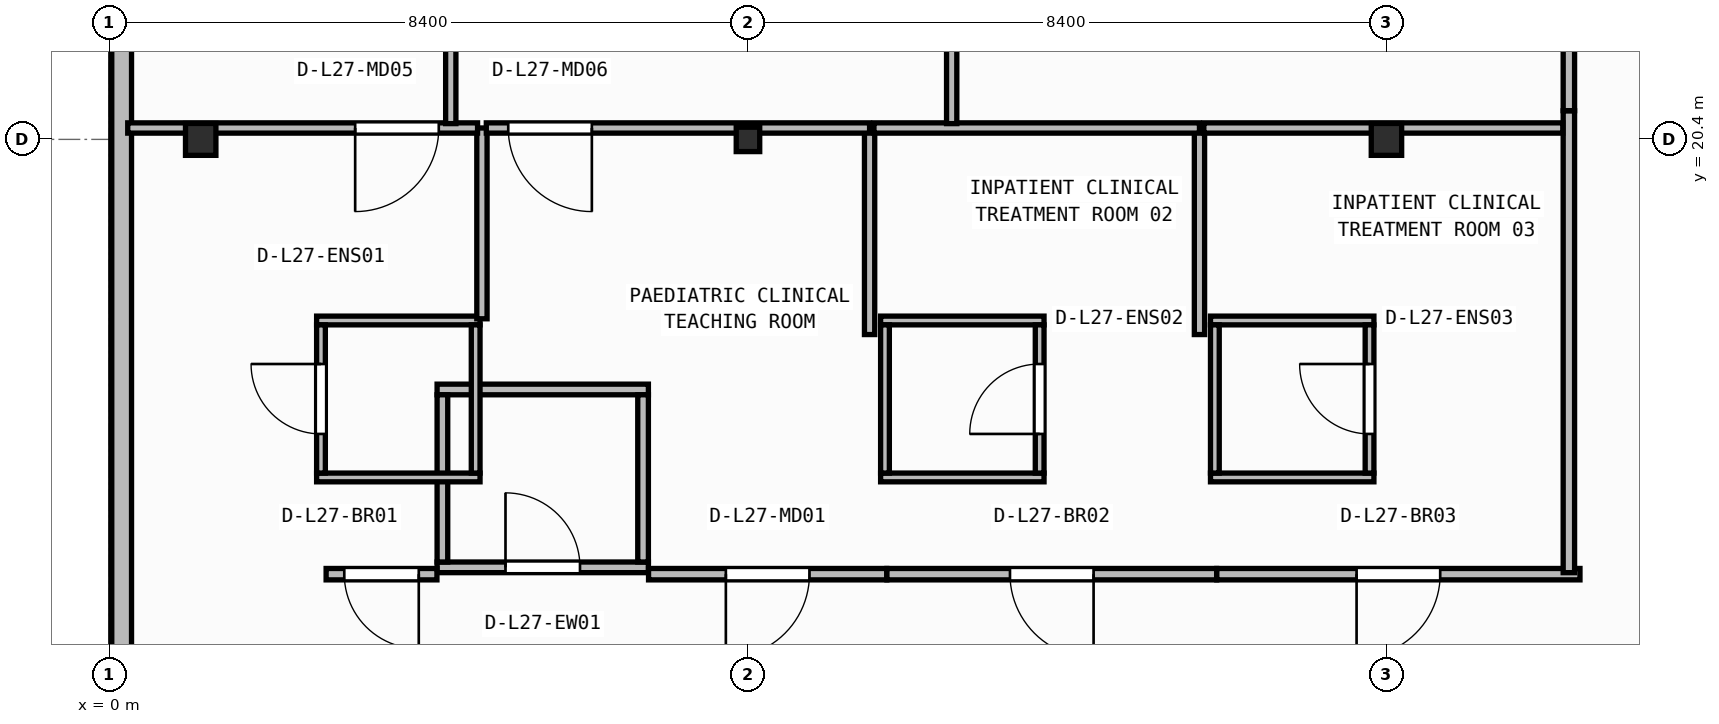
"""IFC4 building model, lengths in metres.
Left out: names, types, materials, properties, quantities, classifications, styles, units other than length and angle.
Written with IfcOpenShell. Run it as: python <this file> out.ifc"""

import sys

from ifc_helpers import new_model, si_unit, direction, frame, frame_2d, origin, origin_2d, place, context, subcontext, project, spatial, rectangle, i_section, extrude, element, fill, save


model = new_model("IFC4")
c1 = context("Model", 3, precision=1e-05, world=origin(), true_north=direction((0.0, 1.0)))
c2 = subcontext(c1, "Body", "Model", "MODEL_VIEW")
j1 = project(units=[si_unit("LENGTHUNIT", "METRE"), si_unit("PLANEANGLEUNIT", "RADIAN")], contexts=[c1])
p1 = place(None, origin())
s1 = spatial("IfcSite", under=j1, at=p1, CompositionType="ELEMENT")
p2 = place(p1, origin())
s2 = spatial("IfcBuilding", under=s1, at=p2, CompositionType="ELEMENT")
p3 = place(p2, frame((0.0, 0.0, 111.25)))
s3 = spatial("IfcBuildingStorey", under=s2, at=p3, CompositionType="ELEMENT", Elevation=111.25)
p4 = place(p3, frame((1.2, 20.4, 0.0), z_axis=(0.0, 0.0, 1.0), x_axis=(1.0, 0.0, 0.0)))
e1 = element("IfcColumn", 1, at=p4, inside=s3, PredefinedType="COLUMN", context=c2, shape_type="SweptSolid", body=[
    extrude(i_section(OverallWidth=0.4, OverallDepth=0.42, WebThickness=0.025, FlangeThickness=0.04, at=origin_2d()), origin(), (0.0, 0.0, 1.0), 3.95),
])
p5 = place(p3, frame((8.4, 20.4, 0.0), z_axis=(0.0, 0.0, 1.0), x_axis=(1.0, 0.0, 0.0)))
e2 = element("IfcColumn", 2, at=p5, inside=s3, PredefinedType="COLUMN", context=c2, shape_type="SweptSolid", body=[
    extrude(i_section(OverallWidth=0.309, OverallDepth=0.321, WebThickness=0.014, FlangeThickness=0.022, FilletRadius=0.017, at=origin_2d()), origin(), (0.0, 0.0, 1.0), 3.95),
])
p6 = place(p3, frame((16.8, 20.4, 0.0), z_axis=(0.0, 0.0, 1.0), x_axis=(1.0, 0.0, 0.0)))
e3 = element("IfcColumn", 3, at=p6, inside=s3, PredefinedType="COLUMN", context=c2, shape_type="SweptSolid", body=[
    extrude(i_section(OverallWidth=0.4, OverallDepth=0.42, WebThickness=0.025, FlangeThickness=0.04, at=origin_2d()), origin(), (0.0, 0.0, 1.0), 3.95),
])
p7 = place(p3, frame((0.16, 40.64, 0.0), z_axis=(0.0, 0.0, 1.0), x_axis=(0.0, -1.0, 0.0)))
e4 = element("IfcWall", 4, at=p7, inside=s3, PredefinedType="STANDARD", context=c2, shape_type="SweptSolid", body=[
    extrude(rectangle(XDim=37.88, YDim=0.26, at=frame_2d((18.94, 0.0))), origin(), (0.0, 0.0, 1.0), 3.71),
])
p8 = place(p7, frame((27.795, 0.0, 0.9)))
e5 = element("IfcOpeningElement", 5, at=p8, cuts=e4, PredefinedType="OPENING", context=c2, shape_type="SweptSolid", body=[
    extrude(rectangle(XDim=2.4, YDim=1.65, at=frame_2d((1.2, 0.825))), frame((0.0, 0.14, 0.0), z_axis=(0.0, -1.0, 0.0), x_axis=(1.0, 0.0, 0.0)), (0.0, 0.0, 1.0), 0.28),
])
p9 = place(p3, frame((4.31, 14.77, 0.0), z_axis=(0.0, 0.0, 1.0), x_axis=(1.0, 0.0, 0.0)))
e6 = element("IfcWall", 6, at=p9, inside=s3, PredefinedType="PARTITIONING", context=c2, shape_type="SweptSolid", body=[
    extrude(rectangle(XDim=2.78, YDim=0.14, at=frame_2d((1.39, 0.0))), origin(), (0.0, 0.0, 1.0), 3.71),
])
p10 = place(p9, frame((0.9, 0.0, 0.0)))
e7 = element("IfcOpeningElement", 7, at=p10, cuts=e6, PredefinedType="OPENING", context=c2, shape_type="SweptSolid", body=[
    extrude(rectangle(XDim=0.98, YDim=2.1, at=frame_2d((0.49, 1.05))), frame((0.0, 0.08, 0.0), z_axis=(0.0, -1.0, 0.0), x_axis=(1.0, 0.0, 0.0)), (0.0, 0.0, 1.0), 0.16),
])
p11 = place(p3, frame((4.31, 17.11, 0.0), z_axis=(0.0, 0.0, 1.0), x_axis=(1.0, 0.0, 0.0)))
e8 = element("IfcWall", 8, at=p11, inside=s3, PredefinedType="PARTITIONING", context=c2, shape_type="SweptSolid", body=[
    extrude(rectangle(XDim=2.78, YDim=0.14, at=frame_2d((1.39, 0.0))), origin(), (0.0, 0.0, 1.0), 3.71),
])
for number, where, z_axis, x_axis in (
    (9, (4.38, 14.84, 0.0), (0.0, 0.0, 1.0), (0.0, 1.0, 0.0)),
    (10, (7.02, 14.84, 0.0), (0.0, 0.0, 1.0), (0.0, 1.0, 0.0)),
):
    element("IfcWall", number, at=place(p3, frame(where, z_axis=z_axis, x_axis=x_axis)), inside=s3, PredefinedType="PARTITIONING", context=c2, shape_type="SweptSolid", body=[
        extrude(rectangle(XDim=2.2, YDim=0.14, at=frame_2d((1.1, 0.0))), origin(), (0.0, 0.0, 1.0), 3.71),
    ])
for number, where, z_axis, x_axis in (
    (11, (2.725, 15.952, 0.0), (0.0, 0.0, 1.0), (1.0, 0.0, 0.0)),
    (12, (2.725, 18.018, 0.0), (0.0, 0.0, 1.0), (1.0, 0.0, 0.0)),
):
    element("IfcWall", number, at=place(p3, frame(where, z_axis=z_axis, x_axis=x_axis)), inside=s3, PredefinedType="PARTITIONING", context=c2, shape_type="SweptSolid", body=[
        extrude(rectangle(XDim=2.15, YDim=0.115, at=frame_2d((1.075, 0.0))), origin(), (0.0, 0.0, 1.0), 3.71),
    ])
p12 = place(p3, frame((2.782, 16.01, 0.0), z_axis=(0.0, 0.0, 1.0), x_axis=(0.0, 1.0, 0.0)))
e13 = element("IfcWall", 13, at=p12, inside=s3, PredefinedType="PARTITIONING", context=c2, shape_type="SweptSolid", body=[
    extrude(rectangle(XDim=1.95, YDim=0.115, at=frame_2d((0.975, 0.0))), origin(), (0.0, 0.0, 1.0), 3.71),
])
p13 = place(p12, frame((0.515, 0.0, 0.0)))
e14 = element("IfcOpeningElement", 14, at=p13, cuts=e13, PredefinedType="OPENING", context=c2, shape_type="SweptSolid", body=[
    extrude(rectangle(XDim=0.92, YDim=2.1, at=frame_2d((0.46, 1.05))), frame((0.0, 0.067, 0.0), z_axis=(0.0, -1.0, 0.0), x_axis=(1.0, 0.0, 0.0)), (0.0, 0.0, 1.0), 0.135),
])
p14 = place(p3, frame((4.817, 16.01, 0.0), z_axis=(0.0, 0.0, 1.0), x_axis=(0.0, 1.0, 0.0)))
e15 = element("IfcWall", 15, at=p14, inside=s3, PredefinedType="PARTITIONING", context=c2, shape_type="SweptSolid", body=[
    extrude(rectangle(XDim=1.95, YDim=0.115, at=frame_2d((0.975, 0.0))), origin(), (0.0, 0.0, 1.0), 3.71),
])
for number, where, z_axis, x_axis in (
    (16, (10.145, 15.952, 0.0), (0.0, 0.0, 1.0), (1.0, 0.0, 0.0)),
    (17, (10.145, 18.018, 0.0), (0.0, 0.0, 1.0), (1.0, 0.0, 0.0)),
):
    element("IfcWall", number, at=place(p3, frame(where, z_axis=z_axis, x_axis=x_axis)), inside=s3, PredefinedType="PARTITIONING", context=c2, shape_type="SweptSolid", body=[
        extrude(rectangle(XDim=2.15, YDim=0.115, at=frame_2d((1.075, 0.0))), origin(), (0.0, 0.0, 1.0), 3.71),
    ])
p15 = place(p3, frame((10.202, 16.01, 0.0), z_axis=(0.0, 0.0, 1.0), x_axis=(0.0, 1.0, 0.0)))
e18 = element("IfcWall", 18, at=p15, inside=s3, PredefinedType="PARTITIONING", context=c2, shape_type="SweptSolid", body=[
    extrude(rectangle(XDim=1.95, YDim=0.115, at=frame_2d((0.975, 0.0))), origin(), (0.0, 0.0, 1.0), 3.71),
])
p16 = place(p3, frame((12.238, 16.01, 0.0), z_axis=(0.0, 0.0, 1.0), x_axis=(0.0, 1.0, 0.0)))
e19 = element("IfcWall", 19, at=p16, inside=s3, PredefinedType="PARTITIONING", context=c2, shape_type="SweptSolid", body=[
    extrude(rectangle(XDim=1.95, YDim=0.115, at=frame_2d((0.975, 0.0))), origin(), (0.0, 0.0, 1.0), 3.71),
])
p17 = place(p16, frame((0.515, 0.0, 0.0)))
e20 = element("IfcOpeningElement", 20, at=p17, cuts=e19, PredefinedType="OPENING", context=c2, shape_type="SweptSolid", body=[
    extrude(rectangle(XDim=0.92, YDim=2.1, at=frame_2d((0.46, 1.05))), frame((0.0, 0.067, 0.0), z_axis=(0.0, -1.0, 0.0), x_axis=(1.0, 0.0, 0.0)), (0.0, 0.0, 1.0), 0.135),
])
for number, where, z_axis, x_axis in (
    (21, (14.485, 15.952, 0.0), (0.0, 0.0, 1.0), (1.0, 0.0, 0.0)),
    (22, (14.485, 18.018, 0.0), (0.0, 0.0, 1.0), (1.0, 0.0, 0.0)),
):
    element("IfcWall", number, at=place(p3, frame(where, z_axis=z_axis, x_axis=x_axis)), inside=s3, PredefinedType="PARTITIONING", context=c2, shape_type="SweptSolid", body=[
        extrude(rectangle(XDim=2.15, YDim=0.115, at=frame_2d((1.075, 0.0))), origin(), (0.0, 0.0, 1.0), 3.71),
    ])
p18 = place(p3, frame((14.542, 16.01, 0.0), z_axis=(0.0, 0.0, 1.0), x_axis=(0.0, 1.0, 0.0)))
e23 = element("IfcWall", 23, at=p18, inside=s3, PredefinedType="PARTITIONING", context=c2, shape_type="SweptSolid", body=[
    extrude(rectangle(XDim=1.95, YDim=0.115, at=frame_2d((0.975, 0.0))), origin(), (0.0, 0.0, 1.0), 3.71),
])
p19 = place(p3, frame((16.577, 16.01, 0.0), z_axis=(0.0, 0.0, 1.0), x_axis=(0.0, 1.0, 0.0)))
e24 = element("IfcWall", 24, at=p19, inside=s3, PredefinedType="PARTITIONING", context=c2, shape_type="SweptSolid", body=[
    extrude(rectangle(XDim=1.95, YDim=0.115, at=frame_2d((0.975, 0.0))), origin(), (0.0, 0.0, 1.0), 3.71),
])
p20 = place(p19, frame((0.515, 0.0, 0.0)))
e25 = element("IfcOpeningElement", 25, at=p20, cuts=e24, PredefinedType="OPENING", context=c2, shape_type="SweptSolid", body=[
    extrude(rectangle(XDim=0.92, YDim=2.1, at=frame_2d((0.46, 1.05))), frame((0.0, 0.067, 0.0), z_axis=(0.0, -1.0, 0.0), x_axis=(1.0, 0.0, 0.0)), (0.0, 0.0, 1.0), 0.135),
])
p21 = place(p3, frame((4.308, 14.68, 0.0), z_axis=(0.0, 0.0, 1.0), x_axis=(-1.0, 0.0, 0.0)))
e26 = element("IfcWall", 26, at=p21, inside=s3, PredefinedType="PARTITIONING", context=c2, shape_type="SweptSolid", body=[
    extrude(rectangle(XDim=1.458, YDim=0.15, at=frame_2d((0.729, 0.0))), origin(), (0.0, 0.0, 1.0), 3.71),
])
p22 = place(p21, frame((0.239, 0.0, 0.0)))
e27 = element("IfcOpeningElement", 27, at=p22, cuts=e26, PredefinedType="OPENING", context=c2, shape_type="SweptSolid", body=[
    extrude(rectangle(XDim=0.98, YDim=2.1, at=frame_2d((0.49, 1.05))), frame((0.0, 0.085, 0.0), z_axis=(0.0, -1.0, 0.0), x_axis=(1.0, 0.0, 0.0)), (0.0, 0.0, 1.0), 0.17),
])
p23 = place(p3, frame((10.226, 14.68, 0.0), z_axis=(0.0, 0.0, 1.0), x_axis=(-1.0, 0.0, 0.0)))
e28 = element("IfcWall", 28, at=p23, inside=s3, PredefinedType="PARTITIONING", context=c2, shape_type="SweptSolid", body=[
    extrude(rectangle(XDim=3.134, YDim=0.15, at=frame_2d((1.567, 0.0))), origin(), (0.0, 0.0, 1.0), 3.71),
])
p24 = place(p23, frame((1.017, 0.0, 0.0)))
e29 = element("IfcOpeningElement", 29, at=p24, cuts=e28, PredefinedType="OPENING", context=c2, shape_type="SweptSolid", body=[
    extrude(rectangle(XDim=1.1, YDim=2.1, at=frame_2d((0.55, 1.05))), frame((0.0, 0.085, 0.0), z_axis=(0.0, -1.0, 0.0), x_axis=(1.0, 0.0, 0.0)), (0.0, 0.0, 1.0), 0.17),
])
p25 = place(p3, frame((14.566, 14.68, 0.0), z_axis=(0.0, 0.0, 1.0), x_axis=(-1.0, 0.0, 0.0)))
e30 = element("IfcWall", 30, at=p25, inside=s3, PredefinedType="PARTITIONING", context=c2, shape_type="SweptSolid", body=[
    extrude(rectangle(XDim=4.338, YDim=0.15, at=frame_2d((2.169, 0.0))), origin(), (0.0, 0.0, 1.0), 3.71),
])
p26 = place(p25, frame((1.619, 0.0, 0.0)))
e31 = element("IfcOpeningElement", 31, at=p26, cuts=e30, PredefinedType="OPENING", context=c2, shape_type="SweptSolid", body=[
    extrude(rectangle(XDim=1.1, YDim=2.1, at=frame_2d((0.55, 1.05))), frame((0.0, 0.085, 0.0), z_axis=(0.0, -1.0, 0.0), x_axis=(1.0, 0.0, 0.0)), (0.0, 0.0, 1.0), 0.17),
])
p27 = place(p3, frame((19.346, 14.68, 0.0), z_axis=(0.0, 0.0, 1.0), x_axis=(-1.0, 0.0, 0.0)))
e32 = element("IfcWall", 32, at=p27, inside=s3, PredefinedType="PARTITIONING", context=c2, shape_type="SweptSolid", body=[
    extrude(rectangle(XDim=4.778, YDim=0.15, at=frame_2d((2.389, 0.0))), origin(), (0.0, 0.0, 1.0), 3.71),
])
p28 = place(p27, frame((1.839, 0.0, 0.0)))
e33 = element("IfcOpeningElement", 33, at=p28, cuts=e32, PredefinedType="OPENING", context=c2, shape_type="SweptSolid", body=[
    extrude(rectangle(XDim=1.1, YDim=2.1, at=frame_2d((0.55, 1.05))), frame((0.0, 0.085, 0.0), z_axis=(0.0, -1.0, 0.0), x_axis=(1.0, 0.0, 0.0)), (0.0, 0.0, 1.0), 0.17),
])
p29 = place(p3, frame((19.2, 20.776, 0.0), z_axis=(0.0, 0.0, 1.0), x_axis=(0.0, -1.0, 0.0)))
e34 = element("IfcWall", 34, at=p29, inside=s3, PredefinedType="PARTITIONING", context=c2, shape_type="SweptSolid", body=[
    extrude(rectangle(XDim=6.076, YDim=0.15, at=frame_2d((3.038, 0.0))), origin(), (0.0, 0.0, 1.0), 3.71),
])
p30 = place(p3, frame((19.2, 27.26, 0.0), z_axis=(0.0, 0.0, 1.0), x_axis=(0.0, -1.0, 0.0)))
e35 = element("IfcWall", 35, at=p30, inside=s3, PredefinedType="PARTITIONING", context=c2, shape_type="SweptSolid", body=[
    extrude(rectangle(XDim=6.482, YDim=0.15, at=frame_2d((3.241, 0.0))), origin(), (0.0, 0.0, 1.0), 3.71),
])
p31 = place(p30, frame((2.068, 0.0, 0.0)))
e36 = element("IfcOpeningElement", 36, at=p31, cuts=e35, PredefinedType="OPENING", context=c2, shape_type="SweptSolid", body=[
    extrude(rectangle(XDim=1.1, YDim=2.1, at=frame_2d((0.55, 1.05))), frame((0.0, 0.085, 0.0), z_axis=(0.0, -1.0, 0.0), x_axis=(1.0, 0.0, 0.0)), (0.0, 0.0, 1.0), 0.17),
])
p32 = place(p3, frame((4.9, 18.04, 0.0), z_axis=(0.0, 0.0, 1.0), x_axis=(0.0, 1.0, 0.0)))
e37 = element("IfcWall", 37, at=p32, inside=s3, PredefinedType="PARTITIONING", context=c2, shape_type="SweptSolid", body=[
    extrude(rectangle(XDim=2.51, YDim=0.135, at=frame_2d((1.255, 0.0))), origin(), (0.0, 0.0, 1.0), 3.71),
])
p33 = place(p3, frame((4.843, 20.55, 0.0), z_axis=(0.0, 0.0, 1.0), x_axis=(-1.0, 0.0, 0.0)))
e38 = element("IfcWall", 38, at=p33, inside=s3, PredefinedType="PARTITIONING", context=c2, shape_type="SweptSolid", body=[
    extrude(rectangle(XDim=4.603, YDim=0.135, at=frame_2d((2.301, 0.0))), origin(), (0.0, 0.0, 1.0), 3.083),
])
p34 = place(p33, frame((0.51, 0.0, 0.0)))
e39 = element("IfcOpeningElement", 39, at=p34, cuts=e38, PredefinedType="OPENING", context=c2, shape_type="SweptSolid", body=[
    extrude(rectangle(XDim=1.1, YDim=2.1, at=frame_2d((0.55, 1.05))), frame((0.0, 0.077, 0.0), z_axis=(0.0, -1.0, 0.0), x_axis=(1.0, 0.0, 0.0)), (0.0, 0.0, 1.0), 0.155),
])
p35 = place(p3, frame((10.0, 17.833, 0.0), z_axis=(0.0, 0.0, 1.0), x_axis=(0.0, 1.0, 0.0)))
e40 = element("IfcWall", 40, at=p35, inside=s3, PredefinedType="PARTITIONING", context=c2, shape_type="SweptSolid", body=[
    extrude(rectangle(XDim=2.718, YDim=0.135, at=frame_2d((1.359, 0.0))), origin(), (0.0, 0.0, 1.0), 3.71),
])
p36 = place(p3, frame((10.0, 20.55, 0.0), z_axis=(0.0, 0.0, 1.0), x_axis=(-1.0, 0.0, 0.0)))
e41 = element("IfcWall", 41, at=p36, inside=s3, PredefinedType="PARTITIONING", context=c2, shape_type="SweptSolid", body=[
    extrude(rectangle(XDim=5.042, YDim=0.135, at=frame_2d((2.521, 0.0))), origin(), (0.0, 0.0, 1.0), 3.083),
])
p37 = place(p36, frame((3.654, 0.0, 0.0)))
e42 = element("IfcOpeningElement", 42, at=p37, cuts=e41, PredefinedType="OPENING", context=c2, shape_type="SweptSolid", body=[
    extrude(rectangle(XDim=1.1, YDim=2.1, at=frame_2d((0.55, 1.05))), frame((0.0, 0.077, 0.0), z_axis=(0.0, -1.0, 0.0), x_axis=(1.0, 0.0, 0.0)), (0.0, 0.0, 1.0), 0.155),
])
p38 = place(p3, frame((14.34, 17.833, 0.0), z_axis=(0.0, 0.0, 1.0), x_axis=(0.0, 1.0, 0.0)))
e43 = element("IfcWall", 43, at=p38, inside=s3, PredefinedType="PARTITIONING", context=c2, shape_type="SweptSolid", body=[
    extrude(rectangle(XDim=2.718, YDim=0.135, at=frame_2d((1.359, 0.0))), origin(), (0.0, 0.0, 1.0), 3.71),
])
p39 = place(p3, frame((14.34, 20.55, 0.0), z_axis=(0.0, 0.0, 1.0), x_axis=(-1.0, 0.0, 0.0)))
e44 = element("IfcWall", 44, at=p39, inside=s3, PredefinedType="PARTITIONING", context=c2, shape_type="SweptSolid", body=[
    extrude(rectangle(XDim=4.282, YDim=0.135, at=frame_2d((2.141, 0.0))), origin(), (0.0, 0.0, 1.0), 3.083),
])
p40 = place(p3, frame((19.12, 20.55, 0.0), z_axis=(0.0, 0.0, 1.0), x_axis=(-1.0, 0.0, 0.0)))
e45 = element("IfcWall", 45, at=p40, inside=s3, PredefinedType="PARTITIONING", context=c2, shape_type="SweptSolid", body=[
    extrude(rectangle(XDim=4.723, YDim=0.135, at=frame_2d((2.361, 0.0))), origin(), (0.0, 0.0, 1.0), 3.083),
])
for number, where, z_axis, x_axis in (
    (46, (4.49, 20.607, 0.0), (0.0, 0.0, 1.0), (0.0, 1.0, 0.0)),
    (47, (11.08, 20.607, 0.0), (0.0, 0.0, 1.0), (0.0, 1.0, 0.0)),
):
    element("IfcWall", number, at=place(p3, frame(where, z_axis=z_axis, x_axis=x_axis)), inside=s3, PredefinedType="PARTITIONING", context=c2, shape_type="SweptSolid", body=[
        extrude(rectangle(XDim=6.493, YDim=0.135, at=frame_2d((3.246, 0.0))), origin(), (0.0, 0.0, 1.0), 3.71),
    ])
p41 = place(p10, origin())
e48 = element("IfcDoor", 48, at=p41, inside=s3, OperationType="SINGLE_SWING_LEFT", PredefinedType="DOOR", context=c2, shape_type="SweptSolid", body=[
    extrude(rectangle(XDim=0.98, YDim=2.1, at=frame_2d((0.49, 1.05))), frame((0.0, 0.025, 0.0), z_axis=(0.0, -1.0, 0.0), x_axis=(1.0, 0.0, 0.0)), (0.0, 0.0, 1.0), 0.05),
])
fill(e7, e48)
p42 = place(p13, origin())
e49 = element("IfcDoor", 49, at=p42, inside=s3, OperationType="SINGLE_SWING_RIGHT", PredefinedType="DOOR", context=c2, shape_type="SweptSolid", body=[
    extrude(rectangle(XDim=0.92, YDim=2.1, at=frame_2d((0.46, 1.05))), frame((0.0, 0.025, 0.0), z_axis=(0.0, -1.0, 0.0), x_axis=(1.0, 0.0, 0.0)), (0.0, 0.0, 1.0), 0.05),
])
fill(e14, e49)
p43 = place(p17, origin())
e50 = element("IfcDoor", 50, at=p43, inside=s3, OperationType="SINGLE_SWING_LEFT", PredefinedType="DOOR", context=c2, shape_type="SweptSolid", body=[
    extrude(rectangle(XDim=0.92, YDim=2.1, at=frame_2d((0.46, 1.05))), frame((0.0, 0.025, 0.0), z_axis=(0.0, -1.0, 0.0), x_axis=(1.0, 0.0, 0.0)), (0.0, 0.0, 1.0), 0.05),
])
fill(e20, e50)
p44 = place(p20, origin())
e51 = element("IfcDoor", 51, at=p44, inside=s3, OperationType="SINGLE_SWING_RIGHT", PredefinedType="DOOR", context=c2, shape_type="SweptSolid", body=[
    extrude(rectangle(XDim=0.92, YDim=2.1, at=frame_2d((0.46, 1.05))), frame((0.0, 0.025, 0.0), z_axis=(0.0, -1.0, 0.0), x_axis=(1.0, 0.0, 0.0)), (0.0, 0.0, 1.0), 0.05),
])
fill(e25, e51)
p45 = place(p22, origin())
e52 = element("IfcDoor", 52, at=p45, inside=s3, OperationType="SINGLE_SWING_LEFT", PredefinedType="DOOR", context=c2, shape_type="SweptSolid", body=[
    extrude(rectangle(XDim=0.98, YDim=2.1, at=frame_2d((0.49, 1.05))), frame((0.0, 0.025, 0.0), z_axis=(0.0, -1.0, 0.0), x_axis=(1.0, 0.0, 0.0)), (0.0, 0.0, 1.0), 0.05),
])
fill(e27, e52)
p46 = place(p24, origin())
e53 = element("IfcDoor", 53, at=p46, inside=s3, OperationType="SINGLE_SWING_RIGHT", PredefinedType="DOOR", context=c2, shape_type="SweptSolid", body=[
    extrude(rectangle(XDim=1.1, YDim=2.1, at=frame_2d((0.55, 1.05))), frame((0.0, 0.025, 0.0), z_axis=(0.0, -1.0, 0.0), x_axis=(1.0, 0.0, 0.0)), (0.0, 0.0, 1.0), 0.05),
])
fill(e29, e53)
p47 = place(p26, origin())
e54 = element("IfcDoor", 54, at=p47, inside=s3, OperationType="SINGLE_SWING_LEFT", PredefinedType="DOOR", context=c2, shape_type="SweptSolid", body=[
    extrude(rectangle(XDim=1.1, YDim=2.1, at=frame_2d((0.55, 1.05))), frame((0.0, 0.025, 0.0), z_axis=(0.0, -1.0, 0.0), x_axis=(1.0, 0.0, 0.0)), (0.0, 0.0, 1.0), 0.05),
])
fill(e31, e54)
p48 = place(p28, origin())
e55 = element("IfcDoor", 55, at=p48, inside=s3, OperationType="SINGLE_SWING_RIGHT", PredefinedType="DOOR", context=c2, shape_type="SweptSolid", body=[
    extrude(rectangle(XDim=1.1, YDim=2.1, at=frame_2d((0.55, 1.05))), frame((0.0, 0.025, 0.0), z_axis=(0.0, -1.0, 0.0), x_axis=(1.0, 0.0, 0.0)), (0.0, 0.0, 1.0), 0.05),
])
fill(e33, e55)
p49 = place(p34, origin())
e56 = element("IfcDoor", 56, at=p49, inside=s3, OperationType="SINGLE_SWING_RIGHT", PredefinedType="DOOR", context=c2, shape_type="SweptSolid", body=[
    extrude(rectangle(XDim=1.1, YDim=2.1, at=frame_2d((0.55, 1.05))), frame((0.0, 0.025, 0.0), z_axis=(0.0, -1.0, 0.0), x_axis=(1.0, 0.0, 0.0)), (0.0, 0.0, 1.0), 0.05),
])
fill(e39, e56)
p50 = place(p37, origin())
e57 = element("IfcDoor", 57, at=p50, inside=s3, OperationType="SINGLE_SWING_LEFT", PredefinedType="DOOR", context=c2, shape_type="SweptSolid", body=[
    extrude(rectangle(XDim=1.1, YDim=2.1, at=frame_2d((0.55, 1.05))), frame((0.0, 0.025, 0.0), z_axis=(0.0, -1.0, 0.0), x_axis=(1.0, 0.0, 0.0)), (0.0, 0.0, 1.0), 0.05),
])
fill(e42, e57)
save(model, sys.argv[1])
